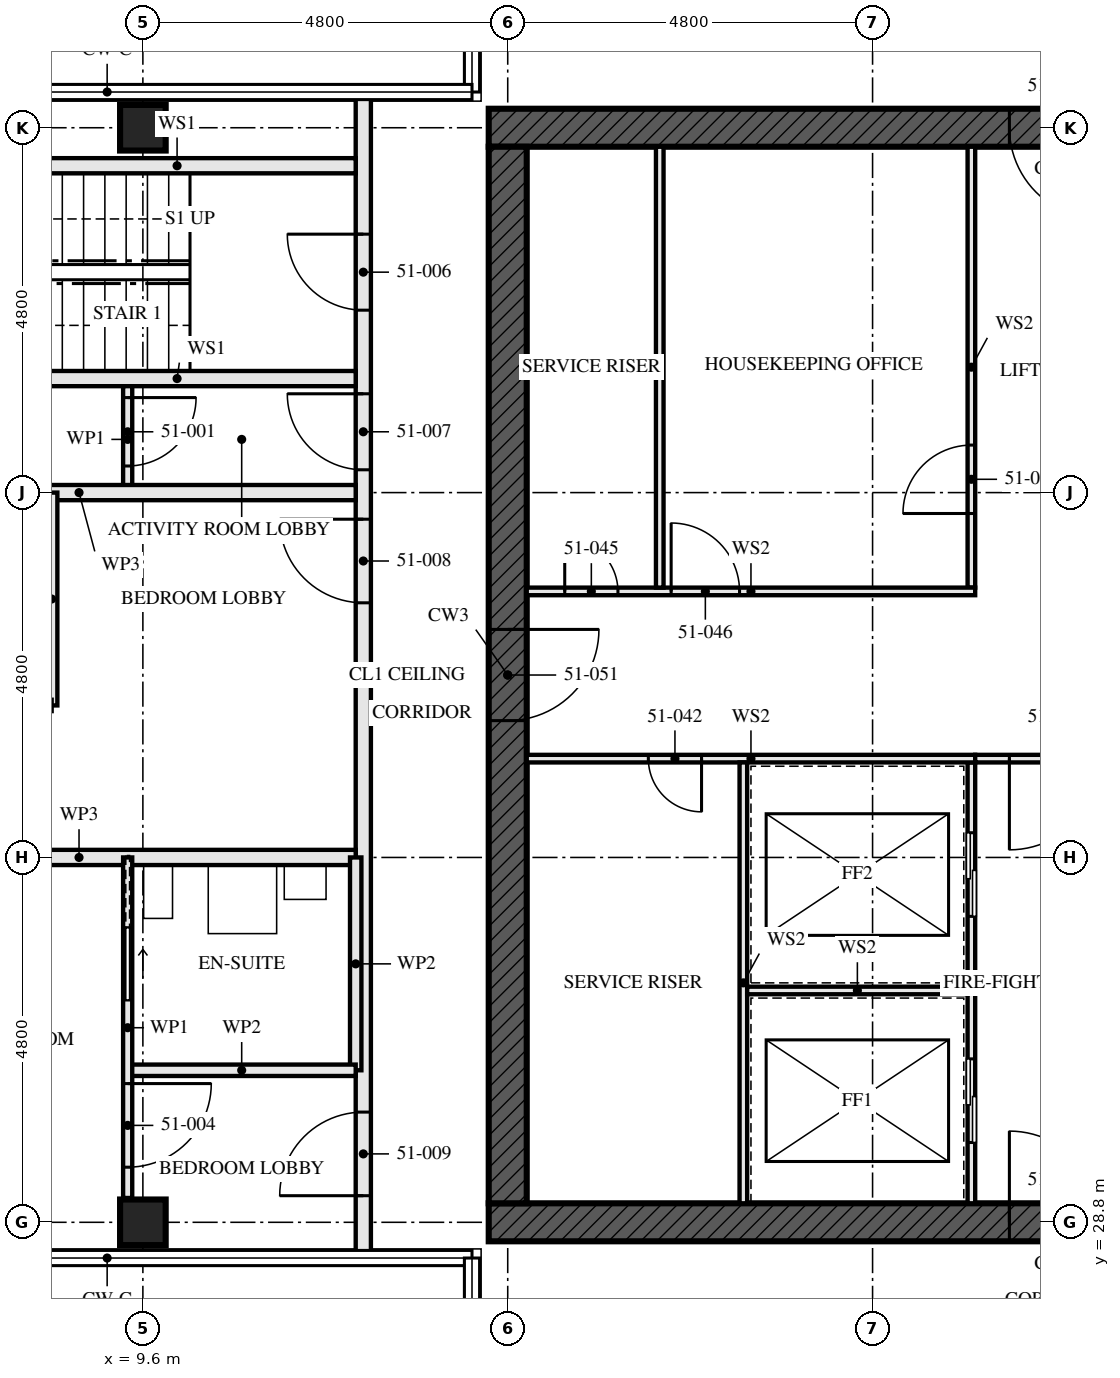
"""IFC4 building model, lengths in metres.
Left out: names, types, materials, properties, quantities, classifications, styles, units other than length and angle.
Written with IfcOpenShell. Run it as: python <this file> out.ifc"""

import sys

from ifc_helpers import new_model, si_unit, direction, frame, frame_2d, origin, origin_2d, place, context, subcontext, project, spatial, rectangle, hollow_rectangle, extrude, element, fill, save


model = new_model("IFC4")
c1 = context("Model", 3, precision=1e-05, world=origin(), true_north=direction((0.0, 1.0)))
c2 = subcontext(c1, "Body", "Model", "MODEL_VIEW")
j1 = project(units=[si_unit("LENGTHUNIT", "METRE"), si_unit("PLANEANGLEUNIT", "RADIAN")], contexts=[c1])
p1 = place(None, origin())
s1 = spatial("IfcSite", under=j1, at=p1, CompositionType="ELEMENT")
p2 = place(p1, origin())
s2 = spatial("IfcBuilding", under=s1, at=p2, CompositionType="ELEMENT")
p3 = place(p2, frame((0.0, 0.0, 186.5)))
s3 = spatial("IfcBuildingStorey", under=s2, at=p3, CompositionType="ELEMENT", Elevation=186.5)
for number, where, z_axis, x_axis in (
    (1, (9.6, 28.8, 0.0), (0.0, 0.0, 1.0), (0.0, 1.0, 0.0)),
    (2, (9.6, 43.2, 0.0), (0.0, 0.0, 1.0), (0.0, 1.0, 0.0)),
):
    element("IfcColumn", number, at=place(p3, frame(where, z_axis=z_axis, x_axis=x_axis)), inside=s3, PredefinedType="COLUMN", context=c2, shape_type="SweptSolid", body=[
        extrude(hollow_rectangle(XDim=0.6, YDim=0.6, WallThickness=0.08, at=origin_2d()), origin(), (0.0, 0.0, 1.0), 3.5),
    ])
p4 = place(p3, frame((14.15, 28.8, -0.17), z_axis=(0.0, 0.0, 1.0), x_axis=(1.0, 0.0, 0.0)))
e3 = element("IfcWall", 3, at=p4, inside=s3, PredefinedType="SHEAR", context=c2, shape_type="SweptSolid", body=[
    extrude(rectangle(XDim=14.9, YDim=0.5, at=frame_2d((7.45, 0.0))), origin(), (0.0, 0.0, 1.0), 3.42),
])
p5 = place(p4, frame((6.85, 0.0, 0.17)))
e4 = element("IfcOpeningElement", 4, at=p5, cuts=e3, PredefinedType="OPENING", context=c2, shape_type="SweptSolid", body=[
    extrude(rectangle(XDim=1.2, YDim=2.1, at=frame_2d((0.6, 1.05))), frame((0.0, 0.26, 0.0), z_axis=(0.0, -1.0, 0.0), x_axis=(1.0, 0.0, 0.0)), (0.0, 0.0, 1.0), 0.521),
])
p6 = place(p3, frame((29.05, 43.2, -0.17), z_axis=(0.0, 0.0, 1.0), x_axis=(-1.0, 0.0, 0.0)))
e5 = element("IfcWall", 5, at=p6, inside=s3, PredefinedType="SHEAR", context=c2, shape_type="SweptSolid", body=[
    extrude(rectangle(XDim=14.9, YDim=0.5, at=frame_2d((7.45, 0.0))), origin(), (0.0, 0.0, 1.0), 3.42),
])
p7 = place(p6, frame((6.85, 0.0, 0.17)))
e6 = element("IfcOpeningElement", 6, at=p7, cuts=e5, PredefinedType="OPENING", context=c2, shape_type="SweptSolid", body=[
    extrude(rectangle(XDim=1.2, YDim=2.1, at=frame_2d((0.6, 1.05))), frame((0.0, 0.26, 0.0), z_axis=(0.0, -1.0, 0.0), x_axis=(1.0, 0.0, 0.0)), (0.0, 0.0, 1.0), 0.521),
])
p8 = place(p3, frame((14.4, 42.95, -0.17), z_axis=(0.0, 0.0, 1.0), x_axis=(0.0, -1.0, 0.0)))
e7 = element("IfcWall", 7, at=p8, inside=s3, PredefinedType="SHEAR", context=c2, shape_type="SweptSolid", body=[
    extrude(rectangle(XDim=13.9, YDim=0.5, at=frame_2d((6.95, 0.0))), origin(), (0.0, 0.0, 1.0), 3.42),
])
p9 = place(p8, frame((6.35, 0.0, 0.17)))
e8 = element("IfcOpeningElement", 8, at=p9, cuts=e7, PredefinedType="OPENING", context=c2, shape_type="SweptSolid", body=[
    extrude(rectangle(XDim=1.2, YDim=2.1, at=frame_2d((0.6, 1.05))), frame((0.0, 0.26, 0.0), z_axis=(0.0, -1.0, 0.0), x_axis=(1.0, 0.0, 0.0)), (0.0, 0.0, 1.0), 0.521),
])
for number, where, z_axis, x_axis in (
    (9, (7.7, 42.7, 0.0), (0.0, 0.0, 1.0), (1.0, 0.0, 0.0)),
    (10, (7.7, 39.9, 0.0), (0.0, 0.0, 1.0), (1.0, 0.0, 0.0)),
):
    element("IfcWall", number, at=place(p3, frame(where, z_axis=z_axis, x_axis=x_axis)), inside=s3, PredefinedType="SOLIDWALL", context=c2, shape_type="SweptSolid", body=[
        extrude(rectangle(XDim=4.7, YDim=0.2, at=frame_2d((2.35, 0.0))), origin(), (0.0, 0.0, 1.0), 2.94),
    ])
p10 = place(p3, frame((9.4, 39.8, 0.0), z_axis=(0.0, 0.0, 1.0), x_axis=(0.0, -1.0, 0.0)))
e11 = element("IfcWall", 11, at=p10, inside=s3, PredefinedType="PARTITIONING", context=c2, shape_type="SweptSolid", body=[
    extrude(rectangle(XDim=1.4, YDim=0.12, at=frame_2d((0.7, 0.0))), origin(), (0.0, 0.0, 1.0), 3.25),
])
p11 = place(p10, frame((0.15, 0.0, 0.0)))
e12 = element("IfcOpeningElement", 12, at=p11, cuts=e11, PredefinedType="OPENING", context=c2, shape_type="SweptSolid", body=[
    extrude(rectangle(XDim=0.9, YDim=2.1, at=frame_2d((0.45, 1.05))), frame((0.0, 0.071, 0.0), z_axis=(0.0, -1.0, 0.0), x_axis=(1.0, 0.0, 0.0)), (0.0, 0.0, 1.0), 0.141),
])
p12 = place(p3, frame((5.12, 38.4, 0.0), z_axis=(0.0, 0.0, 1.0), x_axis=(1.0, 0.0, 0.0)))
e13 = element("IfcWall", 13, at=p12, inside=s3, PredefinedType="PARTITIONING", context=c2, shape_type="SweptSolid", body=[
    extrude(rectangle(XDim=7.28, YDim=0.2, at=frame_2d((3.64, 0.0))), origin(), (0.0, 0.0, 1.0), 2.24),
])
p13 = place(p3, frame((8.4, 38.4, 0.0), z_axis=(0.0, 0.0, 1.0), x_axis=(0.0, -1.0, 0.0)))
e14 = element("IfcWall", 14, at=p13, inside=s3, PredefinedType="PARTITIONING", context=c2, shape_type="SweptSolid", body=[
    extrude(rectangle(XDim=2.8, YDim=0.15, at=frame_2d((1.4, 0.0))), origin(), (0.0, 0.0, 1.0), 3.25),
])
p14 = place(p3, frame((5.12, 33.6, 0.0), z_axis=(0.0, 0.0, 1.0), x_axis=(1.0, 0.0, 0.0)))
e15 = element("IfcWall", 15, at=p14, inside=s3, PredefinedType="PARTITIONING", context=c2, shape_type="SweptSolid", body=[
    extrude(rectangle(XDim=7.28, YDim=0.2, at=frame_2d((3.64, 0.0))), origin(), (0.0, 0.0, 1.0), 2.24),
])
p15 = place(p3, frame((9.4, 30.8, 0.0), z_axis=(0.0, 0.0, 1.0), x_axis=(1.0, 0.0, 0.0)))
e16 = element("IfcWall", 16, at=p15, inside=s3, PredefinedType="PARTITIONING", context=c2, shape_type="SweptSolid", body=[
    extrude(rectangle(XDim=3.0, YDim=0.15, at=frame_2d((1.5, 0.0))), origin(), (0.0, 0.0, 1.0), 3.25),
])
p16 = place(p3, frame((12.4, 33.6, 0.0), z_axis=(0.0, 0.0, 1.0), x_axis=(0.0, -1.0, 0.0)))
e17 = element("IfcWall", 17, at=p16, inside=s3, PredefinedType="PARTITIONING", context=c2, shape_type="SweptSolid", body=[
    extrude(rectangle(XDim=2.8, YDim=0.15, at=frame_2d((1.4, 0.0))), origin(), (0.0, 0.0, 1.0), 3.25),
])
p17 = place(p3, frame((9.4, 33.6, 0.0), z_axis=(0.0, 0.0, 1.0), x_axis=(0.0, -1.0, 0.0)))
e18 = element("IfcWall", 18, at=p17, inside=s3, PredefinedType="PARTITIONING", context=c2, shape_type="SweptSolid", body=[
    extrude(rectangle(XDim=4.48, YDim=0.12, at=frame_2d((2.24, 0.0))), origin(), (0.0, 0.0, 1.0), 3.25),
])
p18 = place(p17, frame((2.975, 0.0, 0.0)))
e19 = element("IfcOpeningElement", 19, at=p18, cuts=e18, PredefinedType="OPENING", context=c2, shape_type="SweptSolid", body=[
    extrude(rectangle(XDim=1.1, YDim=2.1, at=frame_2d((0.55, 1.05))), frame((0.0, 0.071, 0.0), z_axis=(0.0, -1.0, 0.0), x_axis=(1.0, 0.0, 0.0)), (0.0, 0.0, 1.0), 0.141),
])
p19 = place(p17, frame((0.925, 0.0, 0.0)))
e20 = element("IfcOpeningElement", 20, at=p19, cuts=e18, PredefinedType="OPENING", context=c2, shape_type="SweptSolid", body=[
    extrude(rectangle(XDim=0.95, YDim=2.1, at=frame_2d((0.475, 1.05))), frame((0.0, 0.071, 0.0), z_axis=(0.0, -1.0, 0.0), x_axis=(1.0, 0.0, 0.0)), (0.0, 0.0, 1.0), 0.141),
])
p20 = place(p3, frame((12.5, 43.65, 0.0), z_axis=(0.0, 0.0, 1.0), x_axis=(0.0, -1.0, 0.0)))
e21 = element("IfcWall", 21, at=p20, inside=s3, PredefinedType="PARTITIONING", context=c2, shape_type="SweptSolid", body=[
    extrude(rectangle(XDim=15.3, YDim=0.2, at=frame_2d((7.65, 0.0))), origin(), (0.0, 0.0, 1.0), 2.04),
])
p21 = place(p20, frame((1.85, 0.0, 0.0)))
e22 = element("IfcOpeningElement", 22, at=p21, cuts=e21, PredefinedType="OPENING", context=c2, shape_type="SweptSolid", body=[
    extrude(rectangle(XDim=1.0, YDim=2.0, at=frame_2d((0.5, 1.0))), frame((0.0, 0.111, 0.0), z_axis=(0.0, -1.0, 0.0), x_axis=(1.0, 0.0, 0.0)), (0.0, 0.0, 1.0), 0.221),
])
p22 = place(p20, frame((3.95, 0.0, 0.0)))
e23 = element("IfcOpeningElement", 23, at=p22, cuts=e21, PredefinedType="OPENING", context=c2, shape_type="SweptSolid", body=[
    extrude(rectangle(XDim=1.0, YDim=2.0, at=frame_2d((0.5, 1.0))), frame((0.0, 0.111, 0.0), z_axis=(0.0, -1.0, 0.0), x_axis=(1.0, 0.0, 0.0)), (0.0, 0.0, 1.0), 0.221),
])
p23 = place(p20, frame((5.6, 0.0, 0.0)))
e24 = element("IfcOpeningElement", 24, at=p23, cuts=e21, PredefinedType="OPENING", context=c2, shape_type="SweptSolid", body=[
    extrude(rectangle(XDim=1.1, YDim=2.0, at=frame_2d((0.55, 1.0))), frame((0.0, 0.111, 0.0), z_axis=(0.0, -1.0, 0.0), x_axis=(1.0, 0.0, 0.0)), (0.0, 0.0, 1.0), 0.221),
])
p24 = place(p20, frame((13.4, 0.0, 0.0)))
e25 = element("IfcOpeningElement", 25, at=p24, cuts=e21, PredefinedType="OPENING", context=c2, shape_type="SweptSolid", body=[
    extrude(rectangle(XDim=1.1, YDim=2.0, at=frame_2d((0.55, 1.0))), frame((0.0, 0.111, 0.0), z_axis=(0.0, -1.0, 0.0), x_axis=(1.0, 0.0, 0.0)), (0.0, 0.0, 1.0), 0.221),
])
p25 = place(p3, frame((16.4, 37.15, 0.0), z_axis=(0.0, 0.0, 1.0), x_axis=(0.0, 1.0, 0.0)))
e26 = element("IfcWall", 26, at=p25, inside=s3, PredefinedType="SOLIDWALL", context=c2, shape_type="SweptSolid", body=[
    extrude(rectangle(XDim=5.8, YDim=0.1, at=frame_2d((2.9, 0.0))), origin(), (0.0, 0.0, 1.0), 3.25),
])
p26 = place(p3, frame((20.5, 29.05, 0.0), z_axis=(0.0, 0.0, 1.0), x_axis=(0.0, 1.0, 0.0)))
e27 = element("IfcWall", 27, at=p26, inside=s3, PredefinedType="SOLIDWALL", context=c2, shape_type="SweptSolid", body=[
    extrude(rectangle(XDim=5.8, YDim=0.1, at=frame_2d((2.9, 0.0))), origin(), (0.0, 0.0, 1.0), 3.25),
])
p27 = place(p26, frame((0.8, 0.0, 0.0)))
e28 = element("IfcOpeningElement", 28, at=p27, cuts=e27, PredefinedType="OPENING", context=c2, shape_type="SweptSolid", body=[
    extrude(rectangle(XDim=1.1, YDim=2.3, at=frame_2d((0.55, 1.15))), frame((0.0, 0.061, 0.0), z_axis=(0.0, -1.0, 0.0), x_axis=(1.0, 0.0, 0.0)), (0.0, 0.0, 1.0), 0.121),
])
p28 = place(p26, frame((3.775, 0.0, 0.0)))
e29 = element("IfcOpeningElement", 29, at=p28, cuts=e27, PredefinedType="OPENING", context=c2, shape_type="SweptSolid", body=[
    extrude(rectangle(XDim=1.1, YDim=2.3, at=frame_2d((0.55, 1.15))), frame((0.0, 0.061, 0.0), z_axis=(0.0, -1.0, 0.0), x_axis=(1.0, 0.0, 0.0)), (0.0, 0.0, 1.0), 0.121),
])
p29 = place(p3, frame((20.5, 37.15, 0.0), z_axis=(0.0, 0.0, 1.0), x_axis=(0.0, 1.0, 0.0)))
e30 = element("IfcWall", 30, at=p29, inside=s3, PredefinedType="SOLIDWALL", context=c2, shape_type="SweptSolid", body=[
    extrude(rectangle(XDim=5.8, YDim=0.1, at=frame_2d((2.9, 0.0))), origin(), (0.0, 0.0, 1.0), 3.25),
])
p30 = place(p29, frame((0.975, 0.0, 0.0)))
e31 = element("IfcOpeningElement", 31, at=p30, cuts=e30, PredefinedType="OPENING", context=c2, shape_type="SweptSolid", body=[
    extrude(rectangle(XDim=0.9, YDim=2.1, at=frame_2d((0.45, 1.05))), frame((0.0, 0.061, 0.0), z_axis=(0.0, -1.0, 0.0), x_axis=(1.0, 0.0, 0.0)), (0.0, 0.0, 1.0), 0.121),
])
p31 = place(p3, frame((14.65, 34.9, 0.0), z_axis=(0.0, 0.0, 1.0), x_axis=(1.0, 0.0, 0.0)))
e32 = element("IfcWall", 32, at=p31, inside=s3, PredefinedType="SOLIDWALL", context=c2, shape_type="SweptSolid", body=[
    extrude(rectangle(XDim=5.9, YDim=0.1, at=frame_2d((2.95, 0.0))), origin(), (0.0, 0.0, 1.0), 3.25),
])
p32 = place(p31, frame((1.6, 0.0, 0.0)))
e33 = element("IfcOpeningElement", 33, at=p32, cuts=e32, PredefinedType="OPENING", context=c2, shape_type="SweptSolid", body=[
    extrude(rectangle(XDim=0.7, YDim=2.1, at=frame_2d((0.35, 1.05))), frame((0.0, 0.061, 0.0), z_axis=(0.0, -1.0, 0.0), x_axis=(1.0, 0.0, 0.0)), (0.0, 0.0, 1.0), 0.121),
])
p33 = place(p3, frame((14.65, 37.1, 0.0), z_axis=(0.0, 0.0, 1.0), x_axis=(1.0, 0.0, 0.0)))
e34 = element("IfcWall", 34, at=p33, inside=s3, PredefinedType="SOLIDWALL", context=c2, shape_type="SweptSolid", body=[
    extrude(rectangle(XDim=5.9, YDim=0.1, at=frame_2d((2.95, 0.0))), origin(), (0.0, 0.0, 1.0), 3.25),
])
p34 = place(p33, frame((0.5, 0.0, 0.0)))
e35 = element("IfcOpeningElement", 35, at=p34, cuts=e34, PredefinedType="OPENING", context=c2, shape_type="SweptSolid", body=[
    extrude(rectangle(XDim=0.7, YDim=2.1, at=frame_2d((0.35, 1.05))), frame((0.0, 0.061, 0.0), z_axis=(0.0, -1.0, 0.0), x_axis=(1.0, 0.0, 0.0)), (0.0, 0.0, 1.0), 0.121),
])
p35 = place(p33, frame((1.9, 0.0, 0.0)))
e36 = element("IfcOpeningElement", 36, at=p35, cuts=e34, PredefinedType="OPENING", context=c2, shape_type="SweptSolid", body=[
    extrude(rectangle(XDim=0.9, YDim=2.1, at=frame_2d((0.45, 1.05))), frame((0.0, 0.061, 0.0), z_axis=(0.0, -1.0, 0.0), x_axis=(1.0, 0.0, 0.0)), (0.0, 0.0, 1.0), 0.121),
])
p36 = place(p3, frame((20.55, 34.9, 0.0), z_axis=(0.0, 0.0, 1.0), x_axis=(1.0, 0.0, 0.0)))
e37 = element("IfcWall", 37, at=p36, inside=s3, PredefinedType="SOLIDWALL", context=c2, shape_type="SweptSolid", body=[
    extrude(rectangle(XDim=2.5, YDim=0.1, at=frame_2d((1.25, 0.0))), origin(), (0.0, 0.0, 1.0), 3.25),
])
p37 = place(p36, frame((0.45, 0.0, 0.0)))
e38 = element("IfcOpeningElement", 38, at=p37, cuts=e37, PredefinedType="OPENING", context=c2, shape_type="SweptSolid", body=[
    extrude(rectangle(XDim=1.2, YDim=2.1, at=frame_2d((0.6, 1.05))), frame((0.0, 0.061, 0.0), z_axis=(0.0, -1.0, 0.0), x_axis=(1.0, 0.0, 0.0)), (0.0, 0.0, 1.0), 0.121),
])
p38 = place(p3, frame((17.5, 29.05, 0.0), z_axis=(0.0, 0.0, 1.0), x_axis=(0.0, 1.0, 0.0)))
e39 = element("IfcWall", 39, at=p38, inside=s3, PredefinedType="SOLIDWALL", context=c2, shape_type="SweptSolid", body=[
    extrude(rectangle(XDim=5.8, YDim=0.1, at=frame_2d((2.9, 0.0))), origin(), (0.0, 0.0, 1.0), 3.25),
])
p39 = place(p3, frame((17.55, 31.85, 0.0), z_axis=(0.0, 0.0, 1.0), x_axis=(1.0, 0.0, 0.0)))
e40 = element("IfcWall", 40, at=p39, inside=s3, PredefinedType="SOLIDWALL", context=c2, shape_type="SweptSolid", body=[
    extrude(rectangle(XDim=2.9, YDim=0.1, at=frame_2d((1.45, 0.0))), origin(), (0.0, 0.0, 1.0), 3.25),
])
p40 = place(p11, origin())
e41 = element("IfcDoor", 41, at=p40, inside=s3, OperationType="SINGLE_SWING_RIGHT", PredefinedType="DOOR", context=c2, shape_type="SweptSolid", body=[
    extrude(rectangle(XDim=0.9, YDim=2.1, at=frame_2d((0.45, 1.05))), frame((0.0, 0.022, 0.0), z_axis=(0.0, -1.0, 0.0), x_axis=(1.0, 0.0, 0.0)), (0.0, 0.0, 1.0), 0.044),
])
fill(e12, e41)
p41 = place(p18, origin())
e42 = element("IfcDoor", 42, at=p41, inside=s3, OperationType="SINGLE_SWING_RIGHT", PredefinedType="DOOR", context=c2, shape_type="SweptSolid", body=[
    extrude(rectangle(XDim=1.1, YDim=2.1, at=frame_2d((0.55, 1.05))), frame((0.0, 0.022, 0.0), z_axis=(0.0, -1.0, 0.0), x_axis=(1.0, 0.0, 0.0)), (0.0, 0.0, 1.0), 0.044),
])
fill(e19, e42)
p42 = place(p19, origin())
e43 = element("IfcDoor", 43, at=p42, inside=s3, OperationType="SLIDING_TO_RIGHT", PredefinedType="DOOR", context=c2, shape_type="SweptSolid", body=[
    extrude(rectangle(XDim=0.95, YDim=2.1, at=frame_2d((0.475, 1.05))), frame((0.0, 0.022, 0.0), z_axis=(0.0, -1.0, 0.0), x_axis=(1.0, 0.0, 0.0)), (0.0, 0.0, 1.0), 0.044),
])
fill(e20, e43)
p43 = place(p21, frame((1.0, 0.0, 0.0), z_axis=(0.0, 0.0, 1.0), x_axis=(-1.0, 0.0, 0.0)))
e44 = element("IfcDoor", 44, at=p43, inside=s3, OperationType="SINGLE_SWING_LEFT", PredefinedType="DOOR", context=c2, shape_type="SweptSolid", body=[
    extrude(rectangle(XDim=1.0, YDim=2.0, at=frame_2d((0.5, 1.0))), frame((0.0, 0.032, 0.0), z_axis=(0.0, -1.0, 0.0), x_axis=(1.0, 0.0, 0.0)), (0.0, 0.0, 1.0), 0.064),
])
fill(e22, e44)
p44 = place(p22, frame((1.0, 0.0, 0.0), z_axis=(0.0, 0.0, 1.0), x_axis=(-1.0, 0.0, 0.0)))
e45 = element("IfcDoor", 45, at=p44, inside=s3, OperationType="SINGLE_SWING_LEFT", PredefinedType="DOOR", context=c2, shape_type="SweptSolid", body=[
    extrude(rectangle(XDim=1.0, YDim=2.0, at=frame_2d((0.5, 1.0))), frame((0.0, 0.027, 0.0), z_axis=(0.0, -1.0, 0.0), x_axis=(1.0, 0.0, 0.0)), (0.0, 0.0, 1.0), 0.054),
])
fill(e23, e45)
p45 = place(p23, frame((1.1, 0.0, 0.0), z_axis=(0.0, 0.0, 1.0), x_axis=(-1.0, 0.0, 0.0)))
e46 = element("IfcDoor", 46, at=p45, inside=s3, OperationType="SINGLE_SWING_LEFT", PredefinedType="DOOR", context=c2, shape_type="SweptSolid", body=[
    extrude(rectangle(XDim=1.1, YDim=2.0, at=frame_2d((0.55, 1.0))), frame((0.0, 0.027, 0.0), z_axis=(0.0, -1.0, 0.0), x_axis=(1.0, 0.0, 0.0)), (0.0, 0.0, 1.0), 0.054),
])
fill(e24, e46)
p46 = place(p24, frame((1.1, 0.0, 0.0), z_axis=(0.0, 0.0, 1.0), x_axis=(-1.0, 0.0, 0.0)))
e47 = element("IfcDoor", 47, at=p46, inside=s3, OperationType="SINGLE_SWING_RIGHT", PredefinedType="DOOR", context=c2, shape_type="SweptSolid", body=[
    extrude(rectangle(XDim=1.1, YDim=2.0, at=frame_2d((0.55, 1.0))), frame((0.0, 0.027, 0.0), z_axis=(0.0, -1.0, 0.0), x_axis=(1.0, 0.0, 0.0)), (0.0, 0.0, 1.0), 0.054),
])
fill(e25, e47)
p47 = place(p27, origin())
e48 = element("IfcDoor", 48, at=p47, inside=s3, OperationType="SLIDING_TO_LEFT", PredefinedType="DOOR", context=c2, shape_type="SweptSolid", body=[
    extrude(rectangle(XDim=1.1, YDim=2.3, at=frame_2d((0.55, 1.15))), frame((0.0, 0.05, 0.0), z_axis=(0.0, -1.0, 0.0), x_axis=(1.0, 0.0, 0.0)), (0.0, 0.0, 1.0), 0.1),
])
fill(e28, e48)
p48 = place(p28, origin())
e49 = element("IfcDoor", 49, at=p48, inside=s3, OperationType="SLIDING_TO_LEFT", PredefinedType="DOOR", context=c2, shape_type="SweptSolid", body=[
    extrude(rectangle(XDim=1.1, YDim=2.3, at=frame_2d((0.55, 1.15))), frame((0.0, 0.05, 0.0), z_axis=(0.0, -1.0, 0.0), x_axis=(1.0, 0.0, 0.0)), (0.0, 0.0, 1.0), 0.1),
])
fill(e29, e49)
p49 = place(p30, origin())
e50 = element("IfcDoor", 50, at=p49, inside=s3, OperationType="SINGLE_SWING_RIGHT", PredefinedType="DOOR", context=c2, shape_type="SweptSolid", body=[
    extrude(rectangle(XDim=0.9, YDim=2.1, at=frame_2d((0.45, 1.05))), frame((0.0, 0.027, 0.0), z_axis=(0.0, -1.0, 0.0), x_axis=(1.0, 0.0, 0.0)), (0.0, 0.0, 1.0), 0.054),
])
fill(e31, e50)
p50 = place(p32, frame((0.7, 0.0, 0.0), z_axis=(0.0, 0.0, 1.0), x_axis=(-1.0, 0.0, 0.0)))
e51 = element("IfcDoor", 51, at=p50, inside=s3, OperationType="SINGLE_SWING_RIGHT", PredefinedType="DOOR", context=c2, shape_type="SweptSolid", body=[
    extrude(rectangle(XDim=0.7, YDim=2.1, at=frame_2d((0.35, 1.05))), frame((0.0, 0.027, 0.0), z_axis=(0.0, -1.0, 0.0), x_axis=(1.0, 0.0, 0.0)), (0.0, 0.0, 1.0), 0.054),
])
fill(e33, e51)
p51 = place(p34, origin())
e52 = element("IfcDoor", 52, at=p51, inside=s3, OperationType="SINGLE_SWING_RIGHT", PredefinedType="DOOR", context=c2, shape_type="SweptSolid", body=[
    extrude(rectangle(XDim=0.7, YDim=2.1, at=frame_2d((0.35, 1.05))), frame((0.0, 0.027, 0.0), z_axis=(0.0, -1.0, 0.0), x_axis=(1.0, 0.0, 0.0)), (0.0, 0.0, 1.0), 0.054),
])
fill(e35, e52)
p52 = place(p35, origin())
e53 = element("IfcDoor", 53, at=p52, inside=s3, OperationType="SINGLE_SWING_RIGHT", PredefinedType="DOOR", context=c2, shape_type="SweptSolid", body=[
    extrude(rectangle(XDim=0.9, YDim=2.1, at=frame_2d((0.45, 1.05))), frame((0.0, 0.027, 0.0), z_axis=(0.0, -1.0, 0.0), x_axis=(1.0, 0.0, 0.0)), (0.0, 0.0, 1.0), 0.054),
])
fill(e36, e53)
p53 = place(p37, frame((1.2, 0.0, 0.0), z_axis=(0.0, 0.0, 1.0), x_axis=(-1.0, 0.0, 0.0)))
e54 = element("IfcDoor", 54, at=p53, inside=s3, OperationType="SINGLE_SWING_LEFT", PredefinedType="DOOR", context=c2, shape_type="SweptSolid", body=[
    extrude(rectangle(XDim=1.2, YDim=2.1, at=frame_2d((0.6, 1.05))), frame((0.0, 0.027, 0.0), z_axis=(0.0, -1.0, 0.0), x_axis=(1.0, 0.0, 0.0)), (0.0, 0.0, 1.0), 0.054),
])
fill(e38, e54)
p54 = place(p5, origin())
e55 = element("IfcDoor", 55, at=p54, inside=s3, OperationType="SINGLE_SWING_LEFT", PredefinedType="DOOR", context=c2, shape_type="SweptSolid", body=[
    extrude(rectangle(XDim=1.2, YDim=2.1, at=frame_2d((0.6, 1.05))), frame((0.0, 0.027, 0.0), z_axis=(0.0, -1.0, 0.0), x_axis=(1.0, 0.0, 0.0)), (0.0, 0.0, 1.0), 0.054),
])
fill(e4, e55)
p55 = place(p9, origin())
e56 = element("IfcDoor", 56, at=p55, inside=s3, OperationType="SINGLE_SWING_LEFT", PredefinedType="DOOR", context=c2, shape_type="SweptSolid", body=[
    extrude(rectangle(XDim=1.2, YDim=2.1, at=frame_2d((0.6, 1.05))), frame((0.0, 0.027, 0.0), z_axis=(0.0, -1.0, 0.0), x_axis=(1.0, 0.0, 0.0)), (0.0, 0.0, 1.0), 0.054),
])
fill(e8, e56)
p56 = place(p7, origin())
e57 = element("IfcDoor", 57, at=p56, inside=s3, OperationType="SINGLE_SWING_LEFT", PredefinedType="DOOR", context=c2, shape_type="SweptSolid", body=[
    extrude(rectangle(XDim=1.2, YDim=2.1, at=frame_2d((0.6, 1.05))), frame((0.0, 0.027, 0.0), z_axis=(0.0, -1.0, 0.0), x_axis=(1.0, 0.0, 0.0)), (0.0, 0.0, 1.0), 0.054),
])
fill(e6, e57)
save(model, sys.argv[1])
